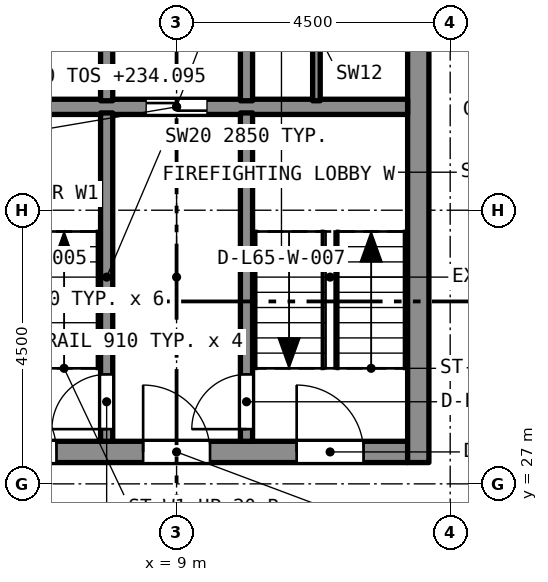
"""IFC4 building model, lengths in metres.
Left out: names, types, materials, properties, quantities, classifications, styles, units other than length and angle.
Written with IfcOpenShell. Run it as: python <this file> out.ifc"""

import sys

from ifc_helpers import new_model, si_unit, direction, frame, frame_2d, origin, place, context, subcontext, project, spatial, rectangle, extrude, element, fill, save


model = new_model("IFC4")
c1 = context("Model", 3, precision=1e-05, world=origin(), true_north=direction((0.0, 1.0)))
c2 = subcontext(c1, "Body", "Model", "MODEL_VIEW")
j1 = project(units=[si_unit("LENGTHUNIT", "METRE"), si_unit("PLANEANGLEUNIT", "RADIAN")], contexts=[c1])
p1 = place(None, origin())
s1 = spatial("IfcSite", under=j1, at=p1, CompositionType="ELEMENT")
p2 = place(p1, origin())
s2 = spatial("IfcBuilding", under=s1, at=p2, CompositionType="ELEMENT")
p3 = place(p2, frame((0.0, 0.0, 232.495)))
s3 = spatial("IfcBuildingStorey", under=s2, at=p3, CompositionType="ELEMENT", Elevation=232.495)
p4 = place(p3, frame((5.2, 27.525, 0.0), z_axis=(0.0, 0.0, 1.0), x_axis=(1.0, 0.0, 0.0)))
e1 = element("IfcWall", 1, at=p4, inside=s3, PredefinedType="SOLIDWALL", context=c2, shape_type="SweptSolid", body=[
    extrude(rectangle(XDim=7.6, YDim=0.35, at=frame_2d((3.8, 0.0))), origin(), (0.0, 0.0, 1.0), 3.2),
])
p5 = place(p4, frame((0.725, 0.0, 0.0)))
e2 = element("IfcOpeningElement", 2, at=p5, cuts=e1, PredefinedType="OPENING", context=c2, shape_type="SweptSolid", body=[
    extrude(rectangle(XDim=1.1, YDim=2.1, at=frame_2d((0.55, 1.05))), frame((0.0, 0.185, 0.0), z_axis=(0.0, -1.0, 0.0), x_axis=(1.0, 0.0, 0.0)), (0.0, 0.0, 1.0), 0.37),
])
p6 = place(p4, frame((3.25, 0.0, 0.0)))
e3 = element("IfcOpeningElement", 3, at=p6, cuts=e1, PredefinedType="OPENING", context=c2, shape_type="SweptSolid", body=[
    extrude(rectangle(XDim=1.1, YDim=2.1, at=frame_2d((0.55, 1.05))), frame((0.0, 0.185, 0.0), z_axis=(0.0, -1.0, 0.0), x_axis=(1.0, 0.0, 0.0)), (0.0, 0.0, 1.0), 0.37),
])
p7 = place(p4, frame((5.775, 0.0, 0.0)))
e4 = element("IfcOpeningElement", 4, at=p7, cuts=e1, PredefinedType="OPENING", context=c2, shape_type="SweptSolid", body=[
    extrude(rectangle(XDim=1.1, YDim=2.1, at=frame_2d((0.55, 1.05))), frame((0.0, 0.185, 0.0), z_axis=(0.0, -1.0, 0.0), x_axis=(1.0, 0.0, 0.0)), (0.0, 0.0, 1.0), 0.37),
])
p8 = place(p3, frame((12.975, 27.35, 0.0), z_axis=(0.0, 0.0, 1.0), x_axis=(0.0, 1.0, 0.0)))
e5 = element("IfcWall", 5, at=p8, inside=s3, PredefinedType="SOLIDWALL", context=c2, shape_type="SweptSolid", body=[
    extrude(rectangle(XDim=12.8, YDim=0.35, at=frame_2d((6.4, 0.0))), origin(), (0.0, 0.0, 1.0), 3.2),
])
p9 = place(p8, frame((10.75, 0.0, 0.0)))
e6 = element("IfcOpeningElement", 6, at=p9, cuts=e5, PredefinedType="OPENING", context=c2, shape_type="SweptSolid", body=[
    extrude(rectangle(XDim=1.1, YDim=2.1, at=frame_2d((0.55, 1.05))), frame((0.0, 0.185, 0.0), z_axis=(0.0, -1.0, 0.0), x_axis=(1.0, 0.0, 0.0)), (0.0, 0.0, 1.0), 0.37),
])
p10 = place(p8, frame((8.6, 0.0, 0.0)))
e7 = element("IfcOpeningElement", 7, at=p10, cuts=e5, PredefinedType="OPENING", context=c2, shape_type="SweptSolid", body=[
    extrude(rectangle(XDim=1.2, YDim=2.1, at=frame_2d((0.6, 1.05))), frame((0.0, 0.185, 0.0), z_axis=(0.0, -1.0, 0.0), x_axis=(1.0, 0.0, 0.0)), (0.0, 0.0, 1.0), 0.37),
])
p11 = place(p3, frame((5.2, 33.2, 0.0), z_axis=(0.0, 0.0, 1.0), x_axis=(1.0, 0.0, 0.0)))
e8 = element("IfcWall", 8, at=p11, inside=s3, PredefinedType="SOLIDWALL", context=c2, shape_type="SweptSolid", body=[
    extrude(rectangle(XDim=7.6, YDim=0.25, at=frame_2d((3.8, 0.0))), origin(), (0.0, 0.0, 1.0), 2.85),
])
p12 = place(p11, frame((3.3, 0.0, 0.0)))
e9 = element("IfcOpeningElement", 9, at=p12, cuts=e8, PredefinedType="OPENING", context=c2, shape_type="SweptSolid", body=[
    extrude(rectangle(XDim=1.0, YDim=2.1, at=frame_2d((0.5, 1.05))), frame((0.0, 0.135, 0.0), z_axis=(0.0, -1.0, 0.0), x_axis=(1.0, 0.0, 0.0)), (0.0, 0.0, 1.0), 0.27),
])
p13 = place(p3, frame((7.85, 27.7, 0.0), z_axis=(0.0, 0.0, 1.0), x_axis=(0.0, 1.0, 0.0)))
e10 = element("IfcWall", 10, at=p13, inside=s3, PredefinedType="SOLIDWALL", context=c2, shape_type="SweptSolid", body=[
    extrude(rectangle(XDim=5.4, YDim=0.2, at=frame_2d((2.7, 0.0))), origin(), (0.0, 0.0, 1.0), 2.85),
])
p14 = place(p13, frame((0.2, 0.0, 0.0)))
e11 = element("IfcOpeningElement", 11, at=p14, cuts=e10, PredefinedType="OPENING", context=c2, shape_type="SweptSolid", body=[
    extrude(rectangle(XDim=0.9, YDim=2.1, at=frame_2d((0.45, 1.05))), frame((0.0, 0.11, 0.0), z_axis=(0.0, -1.0, 0.0), x_axis=(1.0, 0.0, 0.0)), (0.0, 0.0, 1.0), 0.22),
])
p15 = place(p3, frame((10.15, 27.7, 0.0), z_axis=(0.0, 0.0, 1.0), x_axis=(0.0, 1.0, 0.0)))
e12 = element("IfcWall", 12, at=p15, inside=s3, PredefinedType="SOLIDWALL", context=c2, shape_type="SweptSolid", body=[
    extrude(rectangle(XDim=5.4, YDim=0.2, at=frame_2d((2.7, 0.0))), origin(), (0.0, 0.0, 1.0), 2.85),
])
p16 = place(p15, frame((0.2, 0.0, 0.0)))
e13 = element("IfcOpeningElement", 13, at=p16, cuts=e12, PredefinedType="OPENING", context=c2, shape_type="SweptSolid", body=[
    extrude(rectangle(XDim=0.9, YDim=2.1, at=frame_2d((0.45, 1.05))), frame((0.0, 0.11, 0.0), z_axis=(0.0, -1.0, 0.0), x_axis=(1.0, 0.0, 0.0)), (0.0, 0.0, 1.0), 0.22),
])
for number, where, z_axis, x_axis in (
    (14, (7.85, 33.3, 0.0), (0.0, 0.0, 1.0), (0.0, 1.0, 0.0)),
    (15, (10.15, 33.3, 0.0), (0.0, 0.0, 1.0), (0.0, 1.0, 0.0)),
):
    element("IfcWall", number, at=place(p3, frame(where, z_axis=z_axis, x_axis=x_axis)), inside=s3, PredefinedType="SOLIDWALL", context=c2, shape_type="SweptSolid", body=[
        extrude(rectangle(XDim=2.3, YDim=0.2, at=frame_2d((1.15, 0.0))), origin(), (0.0, 0.0, 1.0), 2.85),
    ])
p17 = place(p3, frame((11.3, 33.3, 0.0), z_axis=(0.0, 0.0, 1.0), x_axis=(0.0, 1.0, 0.0)))
e16 = element("IfcWall", 16, at=p17, inside=s3, PredefinedType="PARTITIONING", context=c2, shape_type="SweptSolid", body=[
    extrude(rectangle(XDim=2.3, YDim=0.125, at=frame_2d((1.15, 0.0))), origin(), (0.0, 0.0, 1.0), 2.85),
])
p18 = place(p14, origin())
e17 = element("IfcDoor", 17, at=p18, inside=s3, OperationType="SINGLE_SWING_LEFT", PredefinedType="DOOR", context=c2, shape_type="SweptSolid", body=[
    extrude(rectangle(XDim=0.9, YDim=2.1, at=frame_2d((0.45, 1.05))), frame((0.0, 0.025, 0.0), z_axis=(0.0, -1.0, 0.0), x_axis=(1.0, 0.0, 0.0)), (0.0, 0.0, 1.0), 0.05),
])
fill(e11, e17)
p19 = place(p16, origin())
e18 = element("IfcDoor", 18, at=p19, inside=s3, OperationType="SINGLE_SWING_LEFT", PredefinedType="DOOR", context=c2, shape_type="SweptSolid", body=[
    extrude(rectangle(XDim=0.9, YDim=2.1, at=frame_2d((0.45, 1.05))), frame((0.0, 0.025, 0.0), z_axis=(0.0, -1.0, 0.0), x_axis=(1.0, 0.0, 0.0)), (0.0, 0.0, 1.0), 0.05),
])
fill(e13, e18)
p20 = place(p12, origin())
e19 = element("IfcDoor", 19, at=p20, inside=s3, OperationType="SLIDING_TO_LEFT", PredefinedType="DOOR", context=c2, shape_type="SweptSolid", body=[
    extrude(rectangle(XDim=1.0, YDim=2.1, at=frame_2d((0.5, 1.05))), frame((0.0, 0.025, 0.0), z_axis=(0.0, -1.0, 0.0), x_axis=(1.0, 0.0, 0.0)), (0.0, 0.0, 1.0), 0.05),
])
fill(e9, e19)
p21 = place(p5, origin())
e20 = element("IfcDoor", 20, at=p21, inside=s3, OperationType="SINGLE_SWING_LEFT", PredefinedType="DOOR", context=c2, shape_type="SweptSolid", body=[
    extrude(rectangle(XDim=1.1, YDim=2.1, at=frame_2d((0.55, 1.05))), frame((0.0, 0.025, 0.0), z_axis=(0.0, -1.0, 0.0), x_axis=(1.0, 0.0, 0.0)), (0.0, 0.0, 1.0), 0.05),
])
fill(e2, e20)
p22 = place(p6, origin())
e21 = element("IfcDoor", 21, at=p22, inside=s3, OperationType="SINGLE_SWING_LEFT", PredefinedType="DOOR", context=c2, shape_type="SweptSolid", body=[
    extrude(rectangle(XDim=1.1, YDim=2.1, at=frame_2d((0.55, 1.05))), frame((0.0, 0.025, 0.0), z_axis=(0.0, -1.0, 0.0), x_axis=(1.0, 0.0, 0.0)), (0.0, 0.0, 1.0), 0.05),
])
fill(e3, e21)
p23 = place(p7, origin())
e22 = element("IfcDoor", 22, at=p23, inside=s3, OperationType="SINGLE_SWING_LEFT", PredefinedType="DOOR", context=c2, shape_type="SweptSolid", body=[
    extrude(rectangle(XDim=1.1, YDim=2.1, at=frame_2d((0.55, 1.05))), frame((0.0, 0.025, 0.0), z_axis=(0.0, -1.0, 0.0), x_axis=(1.0, 0.0, 0.0)), (0.0, 0.0, 1.0), 0.05),
])
fill(e4, e22)
save(model, sys.argv[1])
